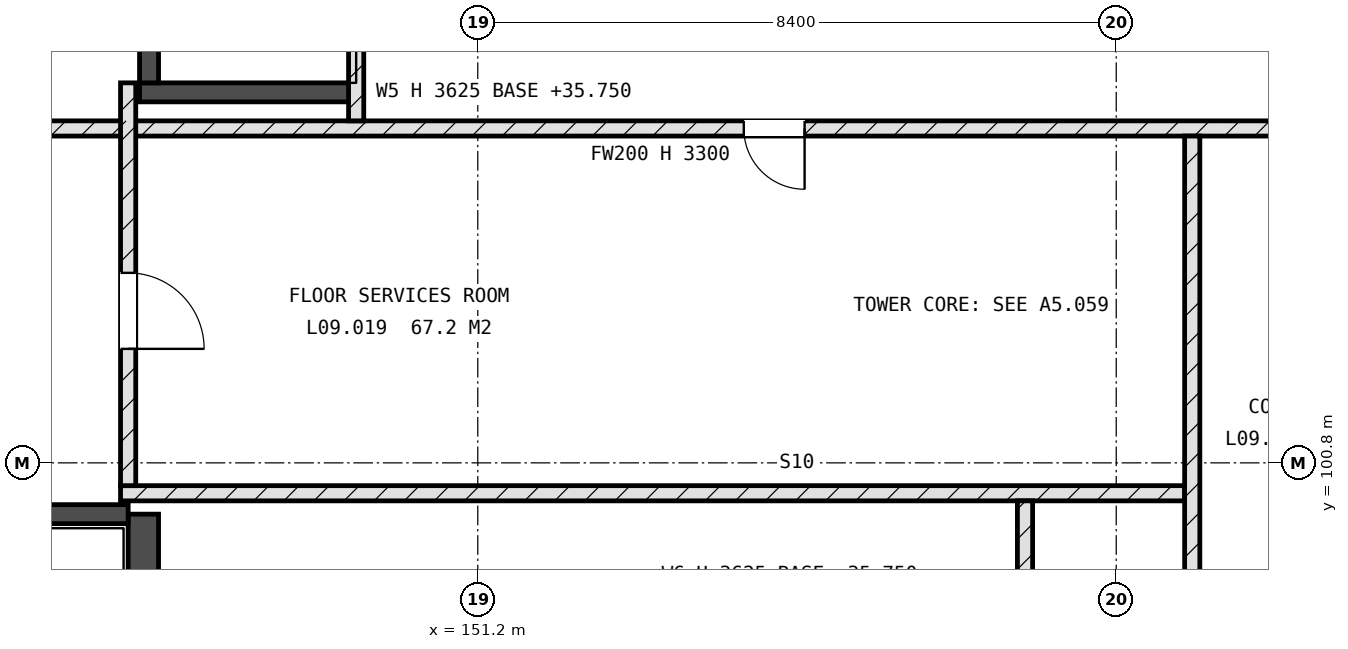
"""IFC4 building model, lengths in metres.
Left out: names, types, materials, properties, quantities, classifications, styles, units other than length and angle.
Written with IfcOpenShell. Run it as: python <this file> out.ifc"""

import sys

from ifc_helpers import new_model, si_unit, direction, frame, frame_2d, origin, place, context, subcontext, project, spatial, rectangle, extrude, element, fill, save


model = new_model("IFC4")
c1 = context("Model", 3, precision=1e-05, world=origin(), true_north=direction((0.0, 1.0)))
c2 = subcontext(c1, "Body", "Model", "MODEL_VIEW")
j1 = project(units=[si_unit("LENGTHUNIT", "METRE"), si_unit("PLANEANGLEUNIT", "RADIAN")], contexts=[c1])
p1 = place(None, origin())
s1 = spatial("IfcSite", under=j1, at=p1, CompositionType="ELEMENT")
p2 = place(p1, origin())
s2 = spatial("IfcBuilding", under=s1, at=p2, CompositionType="ELEMENT")
p3 = place(p2, frame((0.0, 0.0, 36.0)))
s3 = spatial("IfcBuildingStorey", under=s2, at=p3, CompositionType="ELEMENT", Elevation=36.0)
p4 = place(p3, frame((146.8, 92.625, -0.25), z_axis=(0.0, 0.0, 1.0), x_axis=(0.0, 1.0, 0.0)))
e1 = element("IfcWall", 1, at=p4, inside=s3, PredefinedType="SHEAR", context=c2, shape_type="SweptSolid", body=[
    extrude(rectangle(XDim=7.5, YDim=0.4, at=frame_2d((3.75, 0.0))), origin(), (0.0, 0.0, 1.0), 3.625),
])
p5 = place(p4, frame((0.125, 0.0, 0.25)))
e2 = element("IfcOpeningElement", 2, at=p5, cuts=e1, PredefinedType="OPENING", context=c2, shape_type="SweptSolid", body=[
    extrude(rectangle(XDim=1.0, YDim=2.1, at=frame_2d((0.5, 1.05))), frame((0.0, 0.21, 0.0), z_axis=(0.0, -1.0, 0.0), x_axis=(1.0, 0.0, 0.0)), (0.0, 0.0, 1.0), 0.42),
])
p6 = place(p3, frame((143.25, 100.125, -0.25), z_axis=(0.0, 0.0, 1.0), x_axis=(1.0, 0.0, 0.0)))
e3 = element("IfcWall", 3, at=p6, inside=s3, PredefinedType="SHEAR", context=c2, shape_type="SweptSolid", body=[
    extrude(rectangle(XDim=3.35, YDim=0.25, at=frame_2d((1.675, 0.0))), origin(), (0.0, 0.0, 1.0), 3.625),
])
p7 = place(p3, frame((146.75, 105.675, -0.25), z_axis=(0.0, 0.0, 1.0), x_axis=(1.0, 0.0, 0.0)))
e4 = element("IfcWall", 4, at=p7, inside=s3, PredefinedType="SHEAR", context=c2, shape_type="SweptSolid", body=[
    extrude(rectangle(XDim=2.85, YDim=0.25, at=frame_2d((1.425, 0.0))), origin(), (0.0, 0.0, 1.0), 3.625),
])
p8 = place(p3, frame((146.875, 105.8, -0.25), z_axis=(0.0, 0.0, 1.0), x_axis=(0.0, 1.0, 0.0)))
e5 = element("IfcWall", 5, at=p8, inside=s3, PredefinedType="SHEAR", context=c2, shape_type="SweptSolid", body=[
    extrude(rectangle(XDim=2.9, YDim=0.25, at=frame_2d((1.45, 0.0))), origin(), (0.0, 0.0, 1.0), 3.625),
])
p9 = place(p3, frame((146.5, 100.4, 0.0), z_axis=(0.0, 0.0, 1.0), x_axis=(1.0, 0.0, 0.0)))
e6 = element("IfcWall", 6, at=p9, inside=s3, PredefinedType="SOLIDWALL", context=c2, shape_type="SweptSolid", body=[
    extrude(rectangle(XDim=14.0, YDim=0.2, at=frame_2d((7.0, 0.0))), origin(), (0.0, 0.0, 1.0), 3.3),
])
p10 = place(p3, frame((143.25, 105.2, 0.0), z_axis=(0.0, 0.0, 1.0), x_axis=(1.0, 0.0, 0.0)))
e7 = element("IfcWall", 7, at=p10, inside=s3, PredefinedType="SOLIDWALL", context=c2, shape_type="SweptSolid", body=[
    extrude(rectangle(XDim=20.7, YDim=0.2, at=frame_2d((10.35, 0.0))), origin(), (0.0, 0.0, 1.0), 3.3),
])
p11 = place(p10, frame((11.45, 0.0, 0.0)))
e8 = element("IfcOpeningElement", 8, at=p11, cuts=e7, PredefinedType="OPENING", context=c2, shape_type="SweptSolid", body=[
    extrude(rectangle(XDim=0.8, YDim=2.1, at=frame_2d((0.4, 1.05))), frame((0.0, 0.11, 0.0), z_axis=(0.0, -1.0, 0.0), x_axis=(1.0, 0.0, 0.0)), (0.0, 0.0, 1.0), 0.22),
])
p12 = place(p10, frame((18.75, 0.0, 0.0)))
e9 = element("IfcOpeningElement", 9, at=p12, cuts=e7, PredefinedType="OPENING", context=c2, shape_type="SweptSolid", body=[
    extrude(rectangle(XDim=1.0, YDim=2.1, at=frame_2d((0.5, 1.05))), frame((0.0, 0.11, 0.0), z_axis=(0.0, -1.0, 0.0), x_axis=(1.0, 0.0, 0.0)), (0.0, 0.0, 1.0), 0.22),
])
p13 = place(p3, frame((146.6, 100.5, 0.0), z_axis=(0.0, 0.0, 1.0), x_axis=(0.0, 1.0, 0.0)))
e10 = element("IfcWall", 10, at=p13, inside=s3, PredefinedType="SOLIDWALL", context=c2, shape_type="SweptSolid", body=[
    extrude(rectangle(XDim=5.3, YDim=0.2, at=frame_2d((2.65, 0.0))), origin(), (0.0, 0.0, 1.0), 3.3),
])
p14 = place(p13, frame((1.8, 0.0, 0.0)))
e11 = element("IfcOpeningElement", 11, at=p14, cuts=e10, PredefinedType="OPENING", context=c2, shape_type="SweptSolid", body=[
    extrude(rectangle(XDim=1.0, YDim=2.1, at=frame_2d((0.5, 1.05))), frame((0.0, 0.11, 0.0), z_axis=(0.0, -1.0, 0.0), x_axis=(1.0, 0.0, 0.0)), (0.0, 0.0, 1.0), 0.22),
])
p15 = place(p3, frame((149.6, 105.3, 0.0), z_axis=(0.0, 0.0, 1.0), x_axis=(0.0, 1.0, 0.0)))
e12 = element("IfcWall", 12, at=p15, inside=s3, PredefinedType="SOLIDWALL", context=c2, shape_type="SweptSolid", body=[
    extrude(rectangle(XDim=3.675, YDim=0.2, at=frame_2d((1.837, 0.0))), origin(), (0.0, 0.0, 1.0), 3.3),
])
p16 = place(p15, frame((1.4, 0.0, 0.0)))
e13 = element("IfcOpeningElement", 13, at=p16, cuts=e12, PredefinedType="OPENING", context=c2, shape_type="SweptSolid", body=[
    extrude(rectangle(XDim=1.1, YDim=2.1, at=frame_2d((0.55, 1.05))), frame((0.0, 0.11, 0.0), z_axis=(0.0, -1.0, 0.0), x_axis=(1.0, 0.0, 0.0)), (0.0, 0.0, 1.0), 0.22),
])
p17 = place(p3, frame((158.4, 98.7, 0.0), z_axis=(0.0, 0.0, 1.0), x_axis=(0.0, 1.0, 0.0)))
e14 = element("IfcWall", 14, at=p17, inside=s3, PredefinedType="SOLIDWALL", context=c2, shape_type="SweptSolid", body=[
    extrude(rectangle(XDim=1.6, YDim=0.2, at=frame_2d((0.8, 0.0))), origin(), (0.0, 0.0, 1.0), 3.3),
])
p18 = place(p3, frame((160.6, 92.625, 0.0), z_axis=(0.0, 0.0, 1.0), x_axis=(0.0, 1.0, 0.0)))
e15 = element("IfcWall", 15, at=p18, inside=s3, PredefinedType="SOLIDWALL", context=c2, shape_type="SweptSolid", body=[
    extrude(rectangle(XDim=12.475, YDim=0.2, at=frame_2d((6.238, 0.0))), origin(), (0.0, 0.0, 1.0), 3.3),
])
p19 = place(p18, frame((5.075, 0.0, 0.0)))
e16 = element("IfcOpeningElement", 16, at=p19, cuts=e15, PredefinedType="OPENING", context=c2, shape_type="SweptSolid", body=[
    extrude(rectangle(XDim=0.8, YDim=2.1, at=frame_2d((0.4, 1.05))), frame((0.0, 0.11, 0.0), z_axis=(0.0, -1.0, 0.0), x_axis=(1.0, 0.0, 0.0)), (0.0, 0.0, 1.0), 0.22),
])
p20 = place(p18, frame((0.775, 0.0, 0.0)))
e17 = element("IfcOpeningElement", 17, at=p20, cuts=e15, PredefinedType="OPENING", context=c2, shape_type="SweptSolid", body=[
    extrude(rectangle(XDim=1.0, YDim=2.1, at=frame_2d((0.5, 1.05))), frame((0.0, 0.11, 0.0), z_axis=(0.0, -1.0, 0.0), x_axis=(1.0, 0.0, 0.0)), (0.0, 0.0, 1.0), 0.22),
])
p21 = place(p11, origin())
e18 = element("IfcDoor", 18, at=p21, inside=s3, OperationType="SINGLE_SWING_RIGHT", PredefinedType="DOOR", context=c2, shape_type="SweptSolid", body=[
    extrude(rectangle(XDim=0.8, YDim=2.1, at=frame_2d((0.4, 1.05))), frame((0.0, 0.025, 0.0), z_axis=(0.0, -1.0, 0.0), x_axis=(1.0, 0.0, 0.0)), (0.0, 0.0, 1.0), 0.05),
])
fill(e8, e18)
p22 = place(p14, origin())
e19 = element("IfcDoor", 19, at=p22, inside=s3, OperationType="SINGLE_SWING_LEFT", PredefinedType="DOOR", context=c2, shape_type="SweptSolid", body=[
    extrude(rectangle(XDim=1.0, YDim=2.1, at=frame_2d((0.5, 1.05))), frame((0.0, 0.025, 0.0), z_axis=(0.0, -1.0, 0.0), x_axis=(1.0, 0.0, 0.0)), (0.0, 0.0, 1.0), 0.05),
])
fill(e11, e19)
save(model, sys.argv[1])
